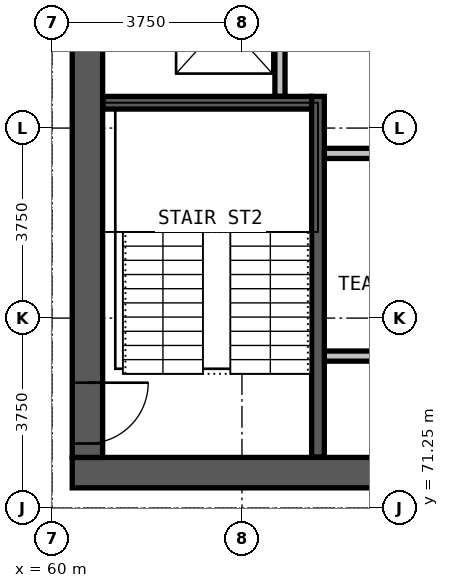
"""IFC4 building model, lengths in metres.
Left out: names, types, materials, properties, quantities, classifications, styles, units other than length and angle.
Written with IfcOpenShell. Run it as: python <this file> out.ifc"""

import sys

from ifc_helpers import new_model, si_unit, direction, frame, frame_2d, origin, place, context, subcontext, project, spatial, rectangle, extrude, element, fill, save


model = new_model("IFC4")
c1 = context("Model", 3, precision=1e-05, world=origin(), true_north=direction((0.0, 1.0)))
c2 = subcontext(c1, "Body", "Model", "MODEL_VIEW")
j1 = project(units=[si_unit("LENGTHUNIT", "METRE"), si_unit("PLANEANGLEUNIT", "RADIAN")], contexts=[c1])
p1 = place(None, origin())
s1 = spatial("IfcSite", under=j1, at=p1, CompositionType="ELEMENT")
p2 = place(p1, origin())
s2 = spatial("IfcBuilding", under=s1, at=p2, CompositionType="ELEMENT")
p3 = place(p2, frame((0.0, 0.0, 239.1)))
s3 = spatial("IfcBuildingStorey", under=s2, at=p3, CompositionType="ELEMENT", Elevation=239.1)
p4 = place(p3, frame((60.4, 71.95, 0.0), z_axis=(0.0, 0.0, 1.0), x_axis=(1.0, 0.0, 0.0)))
e1 = element("IfcWall", 1, at=p4, inside=s3, PredefinedType="SHEAR", context=c2, shape_type="SweptSolid", body=[
    extrude(rectangle(XDim=29.2, YDim=0.6, at=frame_2d((14.6, 0.0))), origin(), (0.0, 0.0, 1.0), 3.6),
])
p5 = place(p3, frame((60.7, 92.75, 0.0), z_axis=(0.0, 0.0, 1.0), x_axis=(0.0, -1.0, 0.0)))
e2 = element("IfcWall", 2, at=p5, inside=s3, PredefinedType="SHEAR", context=c2, shape_type="SweptSolid", body=[
    extrude(rectangle(XDim=20.5, YDim=0.6, at=frame_2d((10.25, 0.0))), origin(), (0.0, 0.0, 1.0), 3.6),
])
p6 = place(p5, frame((19.025, 0.0, 0.0)))
e3 = element("IfcOpeningElement", 3, at=p6, cuts=e2, PredefinedType="OPENING", context=c2, shape_type="SweptSolid", body=[
    extrude(rectangle(XDim=1.2, YDim=2.2, at=frame_2d((0.6, 1.1))), frame((0.0, 0.31, 0.0), z_axis=(0.0, -1.0, 0.0), x_axis=(1.0, 0.0, 0.0)), (0.0, 0.0, 1.0), 0.62),
])
p7 = place(p5, frame((8.025, 0.0, 0.0)))
e4 = element("IfcOpeningElement", 4, at=p7, cuts=e2, PredefinedType="OPENING", context=c2, shape_type="SweptSolid", body=[
    extrude(rectangle(XDim=1.2, YDim=2.2, at=frame_2d((0.6, 1.1))), frame((0.0, 0.31, 0.0), z_axis=(0.0, -1.0, 0.0), x_axis=(1.0, 0.0, 0.0)), (0.0, 0.0, 1.0), 0.62),
])
p8 = place(p3, frame((65.375, 74.25, 0.0), z_axis=(0.0, 0.0, 1.0), x_axis=(1.0, 0.0, 0.0)))
e5 = element("IfcWall", 5, at=p8, inside=s3, PredefinedType="PARTITIONING", context=c2, shape_type="SweptSolid", body=[
    extrude(rectangle(XDim=9.415, YDim=0.2, at=frame_2d((4.708, 0.0))), origin(), (0.0, 0.0, 1.0), 3.3),
])
p9 = place(p3, frame((65.375, 78.25, 0.0), z_axis=(0.0, 0.0, 1.0), x_axis=(1.0, 0.0, 0.0)))
e6 = element("IfcWall", 6, at=p9, inside=s3, PredefinedType="PARTITIONING", context=c2, shape_type="SweptSolid", body=[
    extrude(rectangle(XDim=9.415, YDim=0.2, at=frame_2d((4.708, 0.0))), origin(), (0.0, 0.0, 1.0), 3.3),
])
p10 = place(p9, frame((1.9, 0.0, 0.0)))
e7 = element("IfcOpeningElement", 7, at=p10, cuts=e6, PredefinedType="OPENING", context=c2, shape_type="SweptSolid", body=[
    extrude(rectangle(XDim=0.9, YDim=2.2, at=frame_2d((0.45, 1.1))), frame((0.0, 0.11, 0.0), z_axis=(0.0, -1.0, 0.0), x_axis=(1.0, 0.0, 0.0)), (0.0, 0.0, 1.0), 0.22),
])
p11 = place(p9, frame((6.65, 0.0, 0.0)))
e8 = element("IfcOpeningElement", 8, at=p11, cuts=e6, PredefinedType="OPENING", context=c2, shape_type="SweptSolid", body=[
    extrude(rectangle(XDim=0.9, YDim=2.2, at=frame_2d((0.45, 1.1))), frame((0.0, 0.11, 0.0), z_axis=(0.0, -1.0, 0.0), x_axis=(1.0, 0.0, 0.0)), (0.0, 0.0, 1.0), 0.22),
])
p12 = place(p3, frame((64.5, 79.375, 0.0), z_axis=(0.0, 0.0, 1.0), x_axis=(0.0, 1.0, 0.0)))
e9 = element("IfcWall", 9, at=p12, inside=s3, PredefinedType="PARTITIONING", context=c2, shape_type="SweptSolid", body=[
    extrude(rectangle(XDim=2.915, YDim=0.2, at=frame_2d((1.458, 0.0))), origin(), (0.0, 0.0, 1.0), 3.3),
])
p13 = place(p3, frame((61.01, 79.25, 0.0), z_axis=(0.0, 0.0, 1.0), x_axis=(1.0, 0.0, 0.0)))
e10 = element("IfcWall", 10, at=p13, inside=s3, PredefinedType="PARTITIONING", context=c2, shape_type="SweptSolid", body=[
    extrude(rectangle(XDim=4.115, YDim=0.25, at=frame_2d((2.058, 0.0))), origin(), (0.0, 0.0, 1.0), 3.3),
])
p14 = place(p3, frame((65.25, 72.26, 0.0), z_axis=(0.0, 0.0, 1.0), x_axis=(0.0, 1.0, 0.0)))
e11 = element("IfcWall", 11, at=p14, inside=s3, PredefinedType="PARTITIONING", context=c2, shape_type="SweptSolid", body=[
    extrude(rectangle(XDim=7.115, YDim=0.25, at=frame_2d((3.558, 0.0))), origin(), (0.0, 0.0, 1.0), 3.3),
])
p15 = place(p6, origin())
e12 = element("IfcDoor", 12, at=p15, inside=s3, OperationType="SINGLE_SWING_LEFT", PredefinedType="DOOR", context=c2, shape_type="SweptSolid", body=[
    extrude(rectangle(XDim=1.2, YDim=2.2, at=frame_2d((0.6, 1.1))), frame((0.0, 0.025, 0.0), z_axis=(0.0, -1.0, 0.0), x_axis=(1.0, 0.0, 0.0)), (0.0, 0.0, 1.0), 0.05),
])
fill(e3, e12)
save(model, sys.argv[1])
